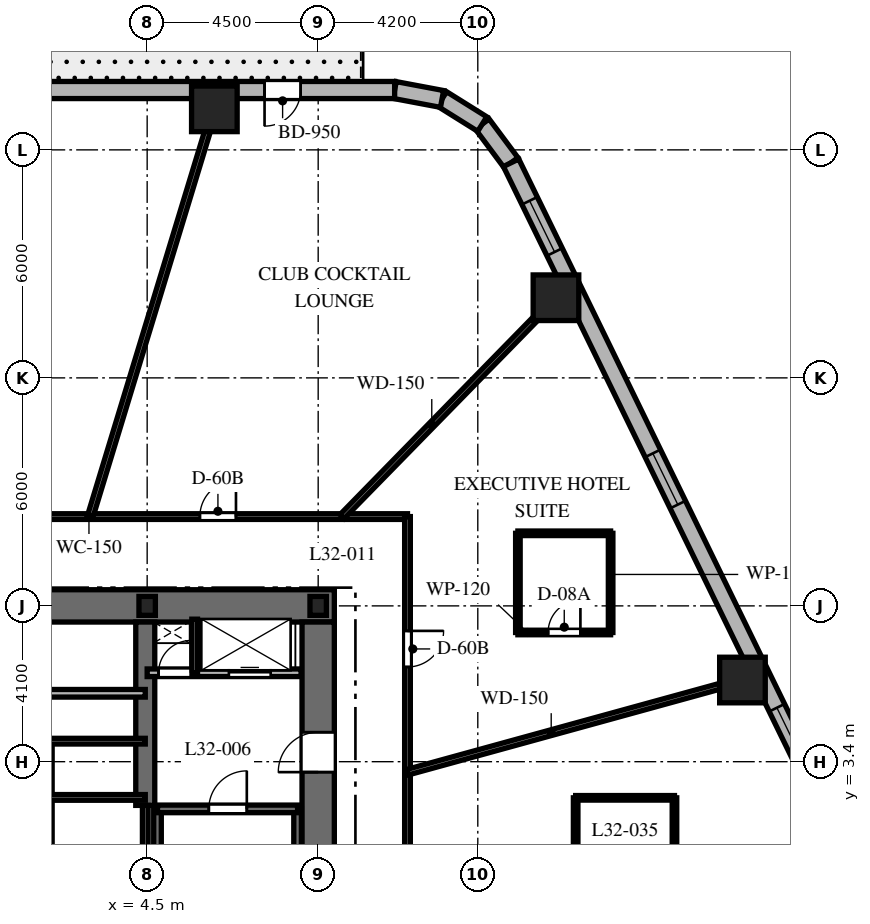
"""IFC4 building model, lengths in metres.
Left out: names, types, materials, properties, quantities, classifications, styles, units other than length and angle.
Written with IfcOpenShell. Run it as: python <this file> out.ifc"""

import sys

from ifc_helpers import new_model, si_unit, direction, frame, frame_2d, origin, origin_2d, place, context, subcontext, project, spatial, rectangle, i_section, extrude, element, fill, save


model = new_model("IFC4")
c1 = context("Model", 3, precision=1e-05, world=origin(), true_north=direction((0.0, 1.0)))
c2 = subcontext(c1, "Body", "Model", "MODEL_VIEW")
j1 = project(units=[si_unit("LENGTHUNIT", "METRE"), si_unit("PLANEANGLEUNIT", "RADIAN")], contexts=[c1])
p1 = place(None, origin())
s1 = spatial("IfcSite", under=j1, at=p1, CompositionType="ELEMENT")
p2 = place(p1, origin())
s2 = spatial("IfcBuilding", under=s1, at=p2, CompositionType="ELEMENT")
p3 = place(p2, frame((0.0, 0.0, 132.1)))
s3 = spatial("IfcBuildingStorey", under=s2, at=p3, CompositionType="ELEMENT", Elevation=132.1)
p4 = place(p3, frame((1.85, 7.5, 0.0), z_axis=(0.0, 0.0, 1.0), x_axis=(1.0, 0.0, 0.0)))
e1 = element("IfcWall", 1, at=p4, inside=s3, PredefinedType="SHEAR", context=c2, shape_type="SweptSolid", body=[
    extrude(rectangle(XDim=7.575, YDim=0.85, at=frame_2d((3.788, 0.0))), origin(), (0.0, 0.0, 1.0), 3.7),
])
p5 = place(p3, frame((9.0, -7.075, 0.0), z_axis=(0.0, 0.0, 1.0), x_axis=(0.0, 1.0, 0.0)))
e2 = element("IfcWall", 2, at=p5, inside=s3, PredefinedType="SHEAR", context=c2, shape_type="SweptSolid", body=[
    extrude(rectangle(XDim=14.15, YDim=0.85, at=frame_2d((7.075, 0.0))), origin(), (0.0, 0.0, 1.0), 3.7),
])
p6 = place(p5, frame((10.2, 0.0, 0.0)))
e3 = element("IfcOpeningElement", 3, at=p6, cuts=e2, PredefinedType="OPENING", context=c2, shape_type="SweptSolid", body=[
    extrude(rectangle(XDim=1.05, YDim=2.15, at=frame_2d((0.525, 1.075))), frame((0.0, 0.435, 0.0), z_axis=(0.0, -1.0, 0.0), x_axis=(1.0, 0.0, 0.0)), (0.0, 0.0, 1.0), 0.87),
])
p7 = place(p3, frame((4.45, 2.25, 0.0), z_axis=(0.0, 0.0, 1.0), x_axis=(0.0, 1.0, 0.0)))
e4 = element("IfcWall", 4, at=p7, inside=s3, PredefinedType="SHEAR", context=c2, shape_type="SweptSolid", body=[
    extrude(rectangle(XDim=4.825, YDim=0.5, at=frame_2d((2.413, 0.0))), origin(), (0.0, 0.0, 1.0), 3.7),
])
for number, where, z_axis, x_axis in (
    (5, (4.772, -6.985, 0.0), (0.0, 0.0, 1.0), (0.0, 1.0, 0.0)),
    (6, (8.458, -6.985, 0.0), (0.0, 0.0, 1.0), (0.0, 1.0, 0.0)),
):
    element("IfcWall", number, at=place(p3, frame(where, z_axis=z_axis, x_axis=x_axis)), inside=s3, PredefinedType="SHEAR", context=c2, shape_type="SweptSolid", body=[
        extrude(rectangle(XDim=9.143, YDim=0.2, at=frame_2d((4.572, 0.0))), origin(), (0.0, 0.0, 1.0), 3.7),
    ])
p8 = place(p3, frame((4.772, 2.158, 0.0), z_axis=(0.0, 0.0, 1.0), x_axis=(1.0, 0.0, 0.0)))
e7 = element("IfcWall", 7, at=p8, inside=s3, PredefinedType="SHEAR", context=c2, shape_type="SweptSolid", body=[
    extrude(rectangle(XDim=3.686, YDim=0.2, at=frame_2d((1.843, 0.0))), origin(), (0.0, 0.0, 1.0), 3.7),
])
p9 = place(p8, frame((1.35, 0.0, 0.0)))
e8 = element("IfcOpeningElement", 8, at=p9, cuts=e7, PredefinedType="OPENING", context=c2, shape_type="SweptSolid", body=[
    extrude(rectangle(XDim=1.0, YDim=2.15, at=frame_2d((0.5, 1.075))), frame((0.0, 0.11, 0.0), z_axis=(0.0, -1.0, 0.0), x_axis=(1.0, 0.0, 0.0)), (0.0, 0.0, 1.0), 0.22),
])
for number, where, z_axis, x_axis in (
    (9, (9.0, 7.5, 0.0), (0.0, 0.0, 1.0), (1.0, 0.0, 0.0)),
    (10, (4.5, 7.5, 0.0), (0.0, 0.0, 1.0), (1.0, 0.0, 0.0)),
):
    element("IfcColumn", number, at=place(p3, frame(where, z_axis=z_axis, x_axis=x_axis)), inside=s3, PredefinedType="COLUMN", context=c2, shape_type="SweptSolid", body=[
        extrude(i_section(OverallWidth=0.432, OverallDepth=0.498, WebThickness=0.056, FlangeThickness=0.089, at=origin_2d()), origin(), (0.0, 0.0, 1.0), 3.7),
    ])
for number, where, z_axis, x_axis in (
    (11, (20.164, 5.549, 0.0), (0.0, 0.0, 1.0), (1.0, 0.0, 0.0)),
    (12, (15.257, 15.609, 0.0), (0.0, 0.0, 1.0), (1.0, 0.0, 0.0)),
    (13, (6.268, 20.58, 0.0), (0.0, 0.0, 1.0), (1.0, 0.0, 0.0)),
):
    element("IfcColumn", number, at=place(p3, frame(where, z_axis=z_axis, x_axis=x_axis)), inside=s3, PredefinedType="COLUMN", context=c2, shape_type="SweptSolid", body=[
        extrude(rectangle(XDim=1.2, YDim=1.2, at=origin_2d()), origin(), (0.0, 0.0, 1.0), 3.7),
    ])
p10 = place(p3, frame((14.076, 19.161, 0.0), z_axis=(0.0, 0.0, 1.0), x_axis=(-0.597226657159, 0.802072515412, 0.0)))
e14 = element("IfcWall", 14, at=p10, inside=s3, PredefinedType="SOLIDWALL", context=c2, shape_type="SweptSolid", body=[
    extrude(rectangle(XDim=1.269, YDim=0.45, at=frame_2d((0.635, 0.0))), origin(), (0.0, 0.0, 1.0), 3.4),
])
p11 = place(p3, frame((13.318, 20.179, 0.0), z_axis=(0.0, 0.0, 1.0), x_axis=(-0.848031272749, 0.529946186362, 0.0)))
e15 = element("IfcWall", 15, at=p11, inside=s3, PredefinedType="SOLIDWALL", context=c2, shape_type="SweptSolid", body=[
    extrude(rectangle(XDim=1.248, YDim=0.45, at=frame_2d((0.624, 0.0))), origin(), (0.0, 0.0, 1.0), 3.4),
])
p12 = place(p3, frame((12.259, 20.84, 0.0), z_axis=(0.0, 0.0, 1.0), x_axis=(-0.982730354425, 0.185043374624, 0.0)))
e16 = element("IfcWall", 16, at=p12, inside=s3, PredefinedType="SOLIDWALL", context=c2, shape_type="SweptSolid", body=[
    extrude(rectangle(XDim=1.269, YDim=0.45, at=frame_2d((0.635, 0.0))), origin(), (0.0, 0.0, 1.0), 3.4),
])
p13 = place(p3, frame((22.238, 2.427, 0.0), z_axis=(0.0, 0.0, 1.0), x_axis=(-0.438374803278, 0.898792262901, 0.0)))
e17 = element("IfcWall", 17, at=p13, inside=s3, PredefinedType="SOLIDWALL", context=c2, shape_type="SweptSolid", body=[
    extrude(rectangle(XDim=18.618, YDim=0.45, at=frame_2d((9.309, 0.0))), origin(), (0.0, 0.0, 1.0), 3.4),
])
p14 = place(p13, frame((8.61, 0.0, 0.8)))
e18 = element("IfcOpeningElement", 18, at=p14, cuts=e17, PredefinedType="OPENING", context=c2, shape_type="SweptSolid", body=[
    extrude(rectangle(XDim=1.5, YDim=1.8, at=frame_2d((0.75, 0.9))), frame((0.0, 0.235, 0.0), z_axis=(0.0, -1.0, 0.0), x_axis=(1.0, 0.0, 0.0)), (0.0, 0.0, 1.0), 0.47),
])
p15 = place(p13, frame((16.006, 0.0, 0.8)))
e19 = element("IfcOpeningElement", 19, at=p15, cuts=e17, PredefinedType="OPENING", context=c2, shape_type="SweptSolid", body=[
    extrude(rectangle(XDim=1.5, YDim=1.8, at=frame_2d((0.75, 0.9))), frame((0.0, 0.235, 0.0), z_axis=(0.0, -1.0, 0.0), x_axis=(1.0, 0.0, 0.0)), (0.0, 0.0, 1.0), 0.47),
])
p16 = place(p13, frame((1.163, 0.0, 0.8)))
e20 = element("IfcOpeningElement", 20, at=p16, cuts=e17, PredefinedType="OPENING", context=c2, shape_type="SweptSolid", body=[
    extrude(rectangle(XDim=1.5, YDim=1.8, at=frame_2d((0.75, 0.9))), frame((0.0, 0.235, 0.0), z_axis=(0.0, -1.0, 0.0), x_axis=(1.0, 0.0, 0.0)), (0.0, 0.0, 1.0), 0.47),
])
p17 = place(p3, frame((11.012, 21.075, 0.0), z_axis=(0.0, 0.0, 1.0), x_axis=(-1.0, 0.0, 0.0)))
e21 = element("IfcWall", 21, at=p17, inside=s3, PredefinedType="SOLIDWALL", context=c2, shape_type="SweptSolid", body=[
    extrude(rectangle(XDim=23.782, YDim=0.45, at=frame_2d((11.891, 0.0))), origin(), (0.0, 0.0, 1.0), 3.4),
])
p18 = place(p17, frame((2.473, 0.0, 0.0)))
e22 = element("IfcOpeningElement", 22, at=p18, cuts=e21, PredefinedType="OPENING", context=c2, shape_type="SweptSolid", body=[
    extrude(rectangle(XDim=0.95, YDim=2.15, at=frame_2d((0.475, 1.075))), frame((0.0, 0.235, 0.0), z_axis=(0.0, -1.0, 0.0), x_axis=(1.0, 0.0, 0.0)), (0.0, 0.0, 1.0), 0.47),
])
p19 = place(p17, frame((11.142, 0.0, 0.8)))
e23 = element("IfcOpeningElement", 23, at=p19, cuts=e21, PredefinedType="OPENING", context=c2, shape_type="SweptSolid", body=[
    extrude(rectangle(XDim=1.5, YDim=1.8, at=frame_2d((0.75, 0.9))), frame((0.0, 0.235, 0.0), z_axis=(0.0, -1.0, 0.0), x_axis=(1.0, 0.0, 0.0)), (0.0, 0.0, 1.0), 0.47),
])
p20 = place(p17, frame((20.741, 0.0, 0.8)))
e24 = element("IfcOpeningElement", 24, at=p20, cuts=e21, PredefinedType="OPENING", context=c2, shape_type="SweptSolid", body=[
    extrude(rectangle(XDim=1.5, YDim=1.8, at=frame_2d((0.75, 0.9))), frame((0.0, 0.235, 0.0), z_axis=(0.0, -1.0, 0.0), x_axis=(1.0, 0.0, 0.0)), (0.0, 0.0, 1.0), 0.47),
])
p21 = place(p3, frame((4.5, 5.74, 0.0), z_axis=(0.0, 0.0, 1.0), x_axis=(1.0, 0.0, 0.0)))
e25 = element("IfcWall", 25, at=p21, inside=s3, PredefinedType="PARTITIONING", context=c2, shape_type="SweptSolid", body=[
    extrude(rectangle(XDim=4.05, YDim=0.2, at=frame_2d((2.025, 0.0))), origin(), (0.0, 0.0, 1.0), 3.4),
])
p22 = place(p21, frame((0.3, 0.0, 0.0)))
e26 = element("IfcOpeningElement", 26, at=p22, cuts=e25, PredefinedType="OPENING", context=c2, shape_type="SweptSolid", body=[
    extrude(rectangle(XDim=0.85, YDim=2.03, at=frame_2d((0.425, 1.015))), frame((0.0, 0.11, 0.0), z_axis=(0.0, -1.0, 0.0), x_axis=(1.0, 0.0, 0.0)), (0.0, 0.0, 1.0), 0.22),
])
p23 = place(p21, frame((2.15, 0.0, 0.0)))
e27 = element("IfcOpeningElement", 27, at=p23, cuts=e25, PredefinedType="OPENING", context=c2, shape_type="SweptSolid", body=[
    extrude(rectangle(XDim=1.1, YDim=2.2, at=frame_2d((0.55, 1.1))), frame((0.0, 0.11, 0.0), z_axis=(0.0, -1.0, 0.0), x_axis=(1.0, 0.0, 0.0)), (0.0, 0.0, 1.0), 0.22),
])
p24 = place(p3, frame((5.75, 5.74, 0.0), z_axis=(0.0, 0.0, 1.0), x_axis=(0.0, 1.0, 0.0)))
e28 = element("IfcWall", 28, at=p24, inside=s3, PredefinedType="PARTITIONING", context=c2, shape_type="SweptSolid", body=[
    extrude(rectangle(XDim=1.41, YDim=0.15, at=frame_2d((0.705, 0.0))), origin(), (0.0, 0.0, 1.0), 3.4),
])
p25 = place(p3, frame((1.85, 5.2, 0.0), z_axis=(0.0, 0.0, 1.0), x_axis=(1.0, 0.0, 0.0)))
e29 = element("IfcWall", 29, at=p25, inside=s3, PredefinedType="PARTITIONING", context=c2, shape_type="SweptSolid", body=[
    extrude(rectangle(XDim=2.6, YDim=0.2, at=frame_2d((1.3, 0.0))), origin(), (0.0, 0.0, 1.0), 3.4),
])
p26 = place(p3, frame((4.45, -1.972, 0.0), z_axis=(0.0, 0.0, 1.0), x_axis=(0.0, 1.0, 0.0)))
e30 = element("IfcWall", 30, at=p26, inside=s3, PredefinedType="PARTITIONING", context=c2, shape_type="SweptSolid", body=[
    extrude(rectangle(XDim=4.222, YDim=0.15, at=frame_2d((2.111, 0.0))), origin(), (0.0, 0.0, 1.0), 3.4),
])
for number, where, z_axis, x_axis in (
    (31, (1.9, 3.94, 0.0), (0.0, 0.0, 1.0), (1.0, 0.0, 0.0)),
    (32, (1.9, 2.46, 0.0), (0.0, 0.0, 1.0), (1.0, 0.0, 0.0)),
):
    element("IfcWall", number, at=place(p3, frame(where, z_axis=z_axis, x_axis=x_axis)), inside=s3, PredefinedType="PARTITIONING", context=c2, shape_type="SweptSolid", body=[
        extrude(rectangle(XDim=2.55, YDim=0.15, at=frame_2d((1.275, 0.0))), origin(), (0.0, 0.0, 1.0), 3.4),
    ])
p27 = place(p3, frame((-11.35, 9.85, 0.0), z_axis=(0.0, 0.0, 1.0), x_axis=(1.0, 0.0, 0.0)))
e33 = element("IfcWall", 33, at=p27, inside=s3, PredefinedType="PARTITIONING", context=c2, shape_type="SweptSolid", body=[
    extrude(rectangle(XDim=22.7, YDim=0.15, at=frame_2d((11.35, 0.0))), origin(), (0.0, 0.0, 1.0), 2.84),
])
p28 = place(p27, frame((17.237, 0.0, 0.0)))
e34 = element("IfcOpeningElement", 34, at=p28, cuts=e33, PredefinedType="OPENING", context=c2, shape_type="SweptSolid", body=[
    extrude(rectangle(XDim=0.95, YDim=2.03, at=frame_2d((0.475, 1.015))), frame((0.0, 0.085, 0.0), z_axis=(0.0, -1.0, 0.0), x_axis=(1.0, 0.0, 0.0)), (0.0, 0.0, 1.0), 0.17),
])
p29 = place(p27, frame((10.45, 0.0, 0.0)))
e35 = element("IfcOpeningElement", 35, at=p29, cuts=e33, PredefinedType="OPENING", context=c2, shape_type="SweptSolid", body=[
    extrude(rectangle(XDim=0.95, YDim=2.03, at=frame_2d((0.475, 1.015))), frame((0.0, 0.085, 0.0), z_axis=(0.0, -1.0, 0.0), x_axis=(1.0, 0.0, 0.0)), (0.0, 0.0, 1.0), 0.17),
])
p30 = place(p27, frame((5.522, 0.0, 0.0)))
e36 = element("IfcOpeningElement", 36, at=p30, cuts=e33, PredefinedType="OPENING", context=c2, shape_type="SweptSolid", body=[
    extrude(rectangle(XDim=0.9, YDim=2.03, at=frame_2d((0.45, 1.015))), frame((0.0, 0.085, 0.0), z_axis=(0.0, -1.0, 0.0), x_axis=(1.0, 0.0, 0.0)), (0.0, 0.0, 1.0), 0.17),
])
p31 = place(p27, frame((1.914, 0.0, 0.0)))
e37 = element("IfcOpeningElement", 37, at=p31, cuts=e33, PredefinedType="OPENING", context=c2, shape_type="SweptSolid", body=[
    extrude(rectangle(XDim=0.9, YDim=2.03, at=frame_2d((0.45, 1.015))), frame((0.0, 0.085, 0.0), z_axis=(0.0, -1.0, 0.0), x_axis=(1.0, 0.0, 0.0)), (0.0, 0.0, 1.0), 0.17),
])
p32 = place(p3, frame((11.35, 9.85, 0.0), z_axis=(0.0, 0.0, 1.0), x_axis=(0.0, -1.0, 0.0)))
e38 = element("IfcWall", 38, at=p32, inside=s3, PredefinedType="PARTITIONING", context=c2, shape_type="SweptSolid", body=[
    extrude(rectangle(XDim=19.7, YDim=0.15, at=frame_2d((9.85, 0.0))), origin(), (0.0, 0.0, 1.0), 2.84),
])
p33 = place(p32, frame((3.008, 0.0, 0.0)))
e39 = element("IfcOpeningElement", 39, at=p33, cuts=e38, PredefinedType="OPENING", context=c2, shape_type="SweptSolid", body=[
    extrude(rectangle(XDim=0.95, YDim=2.03, at=frame_2d((0.475, 1.015))), frame((0.0, 0.085, 0.0), z_axis=(0.0, -1.0, 0.0), x_axis=(1.0, 0.0, 0.0)), (0.0, 0.0, 1.0), 0.17),
])
p34 = place(p32, frame((15.205, 0.0, 0.0)))
e40 = element("IfcOpeningElement", 40, at=p34, cuts=e38, PredefinedType="OPENING", context=c2, shape_type="SweptSolid", body=[
    extrude(rectangle(XDim=0.95, YDim=2.03, at=frame_2d((0.475, 1.015))), frame((0.0, 0.085, 0.0), z_axis=(0.0, -1.0, 0.0), x_axis=(1.0, 0.0, 0.0)), (0.0, 0.0, 1.0), 0.17),
])
p35 = place(p32, frame((8.836, 0.0, 0.0)))
e41 = element("IfcOpeningElement", 41, at=p35, cuts=e38, PredefinedType="OPENING", context=c2, shape_type="SweptSolid", body=[
    extrude(rectangle(XDim=0.95, YDim=2.03, at=frame_2d((0.475, 1.015))), frame((0.0, 0.085, 0.0), z_axis=(0.0, -1.0, 0.0), x_axis=(1.0, 0.0, 0.0)), (0.0, 0.0, 1.0), 0.17),
])
p36 = place(p3, frame((11.35, 3.123, 0.0), z_axis=(0.0, 0.0, 1.0), x_axis=(0.964151983214, 0.265350623261, 0.0)))
e42 = element("IfcWall", 42, at=p36, inside=s3, PredefinedType="PARTITIONING", context=c2, shape_type="SweptSolid", body=[
    extrude(rectangle(XDim=9.645, YDim=0.15, at=frame_2d((4.823, 0.0))), origin(), (0.0, 0.0, 1.0), 2.54),
])
p37 = place(p3, frame((9.628, 9.85, 0.0), z_axis=(0.0, 0.0, 1.0), x_axis=(0.698992824326, 0.715128681805, 0.0)))
e43 = element("IfcWall", 43, at=p37, inside=s3, PredefinedType="PARTITIONING", context=c2, shape_type="SweptSolid", body=[
    extrude(rectangle(XDim=8.579, YDim=0.15, at=frame_2d((4.29, 0.0))), origin(), (0.0, 0.0, 1.0), 2.54),
])
p38 = place(p3, frame((3.0, 9.85, 0.0), z_axis=(0.0, 0.0, 1.0), x_axis=(0.291352035382, 0.95661590593, 0.0)))
e44 = element("IfcWall", 44, at=p38, inside=s3, PredefinedType="PARTITIONING", context=c2, shape_type="SweptSolid", body=[
    extrude(rectangle(XDim=11.734, YDim=0.15, at=frame_2d((5.867, 0.0))), origin(), (0.0, 0.0, 1.0), 2.54),
])
p39 = place(p3, frame((14.255, 6.8, 0.0), z_axis=(0.0, 0.0, 1.0), x_axis=(1.0, 0.0, 0.0)))
e45 = element("IfcWall", 45, at=p39, inside=s3, PredefinedType="PARTITIONING", context=c2, shape_type="SweptSolid", body=[
    extrude(rectangle(XDim=2.44, YDim=0.12, at=frame_2d((1.22, 0.0))), origin(), (0.0, 0.0, 1.0), 2.927),
])
p40 = place(p39, frame((0.795, 0.0, 0.0)))
e46 = element("IfcOpeningElement", 46, at=p40, cuts=e45, PredefinedType="OPENING", context=c2, shape_type="SweptSolid", body=[
    extrude(rectangle(XDim=0.85, YDim=2.03, at=frame_2d((0.425, 1.015))), frame((0.0, 0.07, 0.0), z_axis=(0.0, -1.0, 0.0), x_axis=(1.0, 0.0, 0.0)), (0.0, 0.0, 1.0), 0.14),
])
p41 = place(p3, frame((16.695, 6.8, 0.0), z_axis=(0.0, 0.0, 1.0), x_axis=(0.0, 1.0, 0.0)))
e47 = element("IfcWall", 47, at=p41, inside=s3, PredefinedType="PARTITIONING", context=c2, shape_type="SweptSolid", body=[
    extrude(rectangle(XDim=2.61, YDim=0.12, at=frame_2d((1.305, 0.0))), origin(), (0.0, 0.0, 1.0), 3.4),
])
p42 = place(p3, frame((16.695, 9.41, 0.0), z_axis=(0.0, 0.0, 1.0), x_axis=(-1.0, 0.0, 0.0)))
e48 = element("IfcWall", 48, at=p42, inside=s3, PredefinedType="PARTITIONING", context=c2, shape_type="SweptSolid", body=[
    extrude(rectangle(XDim=2.44, YDim=0.12, at=frame_2d((1.22, 0.0))), origin(), (0.0, 0.0, 1.0), 2.927),
])
p43 = place(p3, frame((14.255, 9.41, 0.0), z_axis=(0.0, 0.0, 1.0), x_axis=(0.0, -1.0, 0.0)))
e49 = element("IfcWall", 49, at=p43, inside=s3, PredefinedType="PARTITIONING", context=c2, shape_type="SweptSolid", body=[
    extrude(rectangle(XDim=2.61, YDim=0.12, at=frame_2d((1.305, 0.0))), origin(), (0.0, 0.0, 1.0), 3.4),
])
p44 = place(p3, frame((18.375, -0.301, 0.0), z_axis=(0.0, 0.0, 1.0), x_axis=(0.0, 1.0, 0.0)))
e50 = element("IfcWall", 50, at=p44, inside=s3, PredefinedType="PARTITIONING", context=c2, shape_type="SweptSolid", body=[
    extrude(rectangle(XDim=2.75, YDim=0.12, at=frame_2d((1.375, 0.0))), origin(), (0.0, 0.0, 1.0), 3.4),
])
p45 = place(p3, frame((18.375, 2.449, 0.0), z_axis=(0.0, 0.0, 1.0), x_axis=(-1.0, 0.0, 0.0)))
e51 = element("IfcWall", 51, at=p45, inside=s3, PredefinedType="PARTITIONING", context=c2, shape_type="SweptSolid", body=[
    extrude(rectangle(XDim=2.6, YDim=0.12, at=frame_2d((1.3, 0.0))), origin(), (0.0, 0.0, 1.0), 2.84),
])
p46 = place(p3, frame((15.775, 2.449, 0.0), z_axis=(0.0, 0.0, 1.0), x_axis=(0.0, -1.0, 0.0)))
e52 = element("IfcWall", 52, at=p46, inside=s3, PredefinedType="PARTITIONING", context=c2, shape_type="SweptSolid", body=[
    extrude(rectangle(XDim=2.75, YDim=0.12, at=frame_2d((1.375, 0.0))), origin(), (0.0, 0.0, 1.0), 3.4),
])
p47 = place(p14, origin())
e53 = element("IfcWindow", 53, at=p47, inside=s3, PartitioningType="SINGLE_PANEL", PredefinedType="WINDOW", context=c2, shape_type="SweptSolid", body=[
    extrude(rectangle(XDim=1.5, YDim=1.8, at=frame_2d((0.75, 0.9))), frame((0.0, 0.03, 0.0), z_axis=(0.0, -1.0, 0.0), x_axis=(1.0, 0.0, 0.0)), (0.0, 0.0, 1.0), 0.06),
])
fill(e18, e53)
p48 = place(p15, origin())
e54 = element("IfcWindow", 54, at=p48, inside=s3, PartitioningType="SINGLE_PANEL", PredefinedType="WINDOW", context=c2, shape_type="SweptSolid", body=[
    extrude(rectangle(XDim=1.5, YDim=1.8, at=frame_2d((0.75, 0.9))), frame((0.0, 0.03, 0.0), z_axis=(0.0, -1.0, 0.0), x_axis=(1.0, 0.0, 0.0)), (0.0, 0.0, 1.0), 0.06),
])
fill(e19, e54)
p49 = place(p16, origin())
e55 = element("IfcWindow", 55, at=p49, inside=s3, PartitioningType="SINGLE_PANEL", PredefinedType="WINDOW", context=c2, shape_type="SweptSolid", body=[
    extrude(rectangle(XDim=1.5, YDim=1.8, at=frame_2d((0.75, 0.9))), frame((0.0, 0.03, 0.0), z_axis=(0.0, -1.0, 0.0), x_axis=(1.0, 0.0, 0.0)), (0.0, 0.0, 1.0), 0.06),
])
fill(e20, e55)
p50 = place(p18, origin())
e56 = element("IfcDoor", 56, at=p50, inside=s3, OperationType="SINGLE_SWING_RIGHT", PredefinedType="DOOR", context=c2, shape_type="SweptSolid", body=[
    extrude(rectangle(XDim=0.95, YDim=2.15, at=frame_2d((0.475, 1.075))), frame((0.0, 0.025, 0.0), z_axis=(0.0, -1.0, 0.0), x_axis=(1.0, 0.0, 0.0)), (0.0, 0.0, 1.0), 0.05),
])
fill(e22, e56)
p51 = place(p9, origin())
e57 = element("IfcDoor", 57, at=p51, inside=s3, OperationType="SINGLE_SWING_RIGHT", PredefinedType="DOOR", context=c2, shape_type="SweptSolid", body=[
    extrude(rectangle(XDim=1.0, YDim=2.15, at=frame_2d((0.5, 1.075))), frame((0.0, 0.025, 0.0), z_axis=(0.0, -1.0, 0.0), x_axis=(1.0, 0.0, 0.0)), (0.0, 0.0, 1.0), 0.05),
])
fill(e8, e57)
p52 = place(p6, origin())
e58 = element("IfcDoor", 58, at=p52, inside=s3, OperationType="SINGLE_SWING_LEFT", PredefinedType="DOOR", context=c2, shape_type="SweptSolid", body=[
    extrude(rectangle(XDim=1.05, YDim=2.15, at=frame_2d((0.525, 1.075))), frame((0.0, 0.025, 0.0), z_axis=(0.0, -1.0, 0.0), x_axis=(1.0, 0.0, 0.0)), (0.0, 0.0, 1.0), 0.05),
])
fill(e3, e58)
p53 = place(p22, origin())
e59 = element("IfcDoor", 59, at=p53, inside=s3, OperationType="SINGLE_SWING_RIGHT", PredefinedType="DOOR", context=c2, shape_type="SweptSolid", body=[
    extrude(rectangle(XDim=0.85, YDim=2.03, at=frame_2d((0.425, 1.015))), frame((0.0, 0.025, 0.0), z_axis=(0.0, -1.0, 0.0), x_axis=(1.0, 0.0, 0.0)), (0.0, 0.0, 1.0), 0.05),
])
fill(e26, e59)
p54 = place(p23, origin())
e60 = element("IfcDoor", 60, at=p54, inside=s3, OperationType="SLIDING_TO_RIGHT", PredefinedType="DOOR", context=c2, shape_type="SweptSolid", body=[
    extrude(rectangle(XDim=1.1, YDim=2.2, at=frame_2d((0.55, 1.1))), frame((0.0, 0.025, 0.0), z_axis=(0.0, -1.0, 0.0), x_axis=(1.0, 0.0, 0.0)), (0.0, 0.0, 1.0), 0.05),
])
fill(e27, e60)
p55 = place(p33, origin())
e61 = element("IfcDoor", 61, at=p55, inside=s3, OperationType="SINGLE_SWING_LEFT", PredefinedType="DOOR", context=c2, shape_type="SweptSolid", body=[
    extrude(rectangle(XDim=0.95, YDim=2.03, at=frame_2d((0.475, 1.015))), frame((0.0, 0.025, 0.0), z_axis=(0.0, -1.0, 0.0), x_axis=(1.0, 0.0, 0.0)), (0.0, 0.0, 1.0), 0.05),
])
fill(e39, e61)
p56 = place(p40, origin())
e62 = element("IfcDoor", 62, at=p56, inside=s3, OperationType="SINGLE_SWING_RIGHT", PredefinedType="DOOR", context=c2, shape_type="SweptSolid", body=[
    extrude(rectangle(XDim=0.85, YDim=2.03, at=frame_2d((0.425, 1.015))), frame((0.0, 0.025, 0.0), z_axis=(0.0, -1.0, 0.0), x_axis=(1.0, 0.0, 0.0)), (0.0, 0.0, 1.0), 0.05),
])
fill(e46, e62)
p57 = place(p28, origin())
e63 = element("IfcDoor", 63, at=p57, inside=s3, OperationType="SINGLE_SWING_RIGHT", PredefinedType="DOOR", context=c2, shape_type="SweptSolid", body=[
    extrude(rectangle(XDim=0.95, YDim=2.03, at=frame_2d((0.475, 1.015))), frame((0.0, 0.025, 0.0), z_axis=(0.0, -1.0, 0.0), x_axis=(1.0, 0.0, 0.0)), (0.0, 0.0, 1.0), 0.05),
])
fill(e34, e63)
save(model, sys.argv[1])
